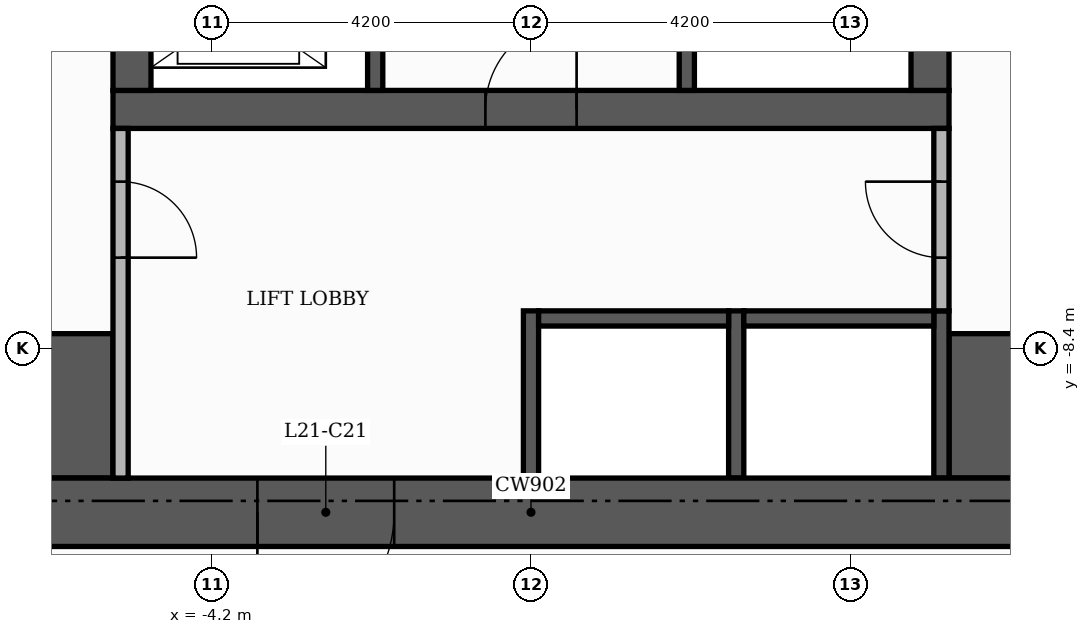
"""IFC4 building model, lengths in metres.
Left out: names, types, materials, properties, quantities, classifications, styles, units other than length and angle.
Written with IfcOpenShell. Run it as: python <this file> out.ifc"""

import sys

from ifc_helpers import new_model, si_unit, direction, frame, frame_2d, origin, place, context, subcontext, project, spatial, rectangle, extrude, element, fill, save


model = new_model("IFC4")
c1 = context("Model", 3, precision=1e-05, world=origin(), true_north=direction((0.0, 1.0)))
c2 = subcontext(c1, "Body", "Model", "MODEL_VIEW")
j1 = project(units=[si_unit("LENGTHUNIT", "METRE"), si_unit("PLANEANGLEUNIT", "RADIAN")], contexts=[c1])
p1 = place(None, origin())
s1 = spatial("IfcSite", under=j1, at=p1, CompositionType="ELEMENT")
p2 = place(p1, origin())
s2 = spatial("IfcBuilding", under=s1, at=p2, CompositionType="ELEMENT")
p3 = place(p2, frame((0.0, 0.0, 90.9)))
s3 = spatial("IfcBuildingStorey", under=s2, at=p3, CompositionType="ELEMENT", Elevation=90.9)
p4 = place(p3, frame((-5.5, -5.25, 0.0), z_axis=(0.0, 0.0, 1.0), x_axis=(1.0, 0.0, 0.0)))
e1 = element("IfcWall", 1, at=p4, inside=s3, PredefinedType="SHEAR", context=c2, shape_type="SweptSolid", body=[
    extrude(rectangle(XDim=11.0, YDim=0.5, at=frame_2d((5.5, 0.0))), origin(), (0.0, 0.0, 1.0), 3.48),
])
p5 = place(p4, frame((4.9, 0.0, 0.0)))
e2 = element("IfcOpeningElement", 2, at=p5, cuts=e1, PredefinedType="OPENING", context=c2, shape_type="SweptSolid", body=[
    extrude(rectangle(XDim=1.2, YDim=2.1, at=frame_2d((0.6, 1.05))), frame((0.0, 0.26, 0.0), z_axis=(0.0, -1.0, 0.0), x_axis=(1.0, 0.0, 0.0)), (0.0, 0.0, 1.0), 0.52),
])
for number, where, z_axis, x_axis in (
    (3, (-5.25, -5.0, 0.0), (0.0, 0.0, 1.0), (0.0, 1.0, 0.0)),
    (4, (5.25, -5.0, 0.0), (0.0, 0.0, 1.0), (0.0, 1.0, 0.0)),
):
    element("IfcWall", number, at=place(p3, frame(where, z_axis=z_axis, x_axis=x_axis)), inside=s3, PredefinedType="SHEAR", context=c2, shape_type="SweptSolid", body=[
        extrude(rectangle(XDim=10.5, YDim=0.5, at=frame_2d((5.25, 0.0))), origin(), (0.0, 0.0, 1.0), 3.48),
    ])
for number, where, z_axis, x_axis in (
    (5, (-10.1, -9.15, 0.0), (0.0, 0.0, 1.0), (1.0, 0.0, 0.0)),
    (6, (5.5, -9.15, 0.0), (0.0, 0.0, 1.0), (1.0, 0.0, 0.0)),
):
    element("IfcWall", number, at=place(p3, frame(where, z_axis=z_axis, x_axis=x_axis)), inside=s3, PredefinedType="SHEAR", context=c2, shape_type="SweptSolid", body=[
        extrude(rectangle(XDim=4.6, YDim=1.9, at=frame_2d((2.3, 0.0))), origin(), (0.0, 0.0, 1.0), 3.48),
    ])
p6 = place(p3, frame((2.05, -5.0, 0.0), z_axis=(0.0, 0.0, 1.0), x_axis=(0.0, 1.0, 0.0)))
e7 = element("IfcWall", 7, at=p6, inside=s3, PredefinedType="SHEAR", context=c2, shape_type="SweptSolid", body=[
    extrude(rectangle(XDim=6.6, YDim=0.2, at=frame_2d((3.3, 0.0))), origin(), (0.0, 0.0, 1.0), 3.48),
])
p7 = place(p6, frame((5.25, 0.0, 0.0)))
e8 = element("IfcOpeningElement", 8, at=p7, cuts=e7, PredefinedType="OPENING", context=c2, shape_type="SweptSolid", body=[
    extrude(rectangle(XDim=1.0, YDim=2.1, at=frame_2d((0.5, 1.05))), frame((0.0, 0.11, 0.0), z_axis=(0.0, -1.0, 0.0), x_axis=(1.0, 0.0, 0.0)), (0.0, 0.0, 1.0), 0.22),
])
for number, where, z_axis, x_axis in (
    (9, (0.0, -10.1, 0.0), (0.0, 0.0, 1.0), (0.0, 1.0, 0.0)),
    (10, (2.7, -10.1, 0.0), (0.0, 0.0, 1.0), (0.0, 1.0, 0.0)),
    (11, (5.4, -10.1, 0.0), (0.0, 0.0, 1.0), (0.0, 1.0, 0.0)),
):
    element("IfcWall", number, at=place(p3, frame(where, z_axis=z_axis, x_axis=x_axis)), inside=s3, PredefinedType="SHEAR", context=c2, shape_type="SweptSolid", body=[
        extrude(rectangle(XDim=2.2, YDim=0.2, at=frame_2d((1.1, 0.0))), origin(), (0.0, 0.0, 1.0), 3.48),
    ])
for number, where, z_axis, x_axis in (
    (12, (0.1, -8.0, 0.0), (0.0, 0.0, 1.0), (1.0, 0.0, 0.0)),
    (13, (2.8, -8.0, 0.0), (0.0, 0.0, 1.0), (1.0, 0.0, 0.0)),
):
    element("IfcWall", number, at=place(p3, frame(where, z_axis=z_axis, x_axis=x_axis)), inside=s3, PredefinedType="SHEAR", context=c2, shape_type="SweptSolid", body=[
        extrude(rectangle(XDim=2.5, YDim=0.2, at=frame_2d((1.25, 0.0))), origin(), (0.0, 0.0, 1.0), 3.48),
    ])
p8 = place(p3, frame((-2.05, -5.0, 0.0), z_axis=(0.0, 0.0, 1.0), x_axis=(0.0, 1.0, 0.0)))
e14 = element("IfcWall", 14, at=p8, inside=s3, PredefinedType="SHEAR", context=c2, shape_type="SweptSolid", body=[
    extrude(rectangle(XDim=3.4, YDim=0.2, at=frame_2d((1.7, 0.0))), origin(), (0.0, 0.0, 1.0), 3.48),
])
p9 = place(p8, frame((0.55, 0.0, 0.0)))
e15 = element("IfcOpeningElement", 15, at=p9, cuts=e14, PredefinedType="OPENING", context=c2, shape_type="SweptSolid", body=[
    extrude(rectangle(XDim=1.1, YDim=2.1, at=frame_2d((0.55, 1.05))), frame((0.0, 0.11, 0.0), z_axis=(0.0, -1.0, 0.0), x_axis=(1.0, 0.0, 0.0)), (0.0, 0.0, 1.0), 0.22),
])
p10 = place(p8, frame((2.45, 0.0, 0.0)))
e16 = element("IfcOpeningElement", 16, at=p10, cuts=e14, PredefinedType="OPENING", context=c2, shape_type="SweptSolid", body=[
    extrude(rectangle(XDim=0.8, YDim=2.1, at=frame_2d((0.4, 1.05))), frame((0.0, 0.11, 0.0), z_axis=(0.0, -1.0, 0.0), x_axis=(1.0, 0.0, 0.0)), (0.0, 0.0, 1.0), 0.22),
])
p11 = place(p3, frame((-11.0, -10.55, 0.0), z_axis=(0.0, 0.0, 1.0), x_axis=(1.0, 0.0, 0.0)))
e17 = element("IfcWall", 17, at=p11, inside=s3, PredefinedType="SHEAR", context=c2, shape_type="SweptSolid", body=[
    extrude(rectangle(XDim=22.0, YDim=0.9, at=frame_2d((11.0, 0.0))), origin(), (0.0, 0.0, 1.0), 3.48),
])
p12 = place(p11, frame((7.4, 0.0, 0.0)))
e18 = element("IfcOpeningElement", 18, at=p12, cuts=e17, PredefinedType="OPENING", context=c2, shape_type="SweptSolid", body=[
    extrude(rectangle(XDim=1.8, YDim=2.2, at=frame_2d((0.9, 1.1))), frame((0.0, 0.46, 0.0), z_axis=(0.0, -1.0, 0.0), x_axis=(1.0, 0.0, 0.0)), (0.0, 0.0, 1.0), 0.92),
])
p13 = place(p3, frame((-5.4, -10.1, 0.0), z_axis=(0.0, 0.0, 1.0), x_axis=(0.0, 1.0, 0.0)))
e19 = element("IfcWall", 19, at=p13, inside=s3, PredefinedType="PARTITIONING", context=c2, shape_type="SweptSolid", body=[
    extrude(rectangle(XDim=4.6, YDim=0.2, at=frame_2d((2.3, 0.0))), origin(), (0.0, 0.0, 1.0), 3.48),
])
p14 = place(p13, frame((2.9, 0.0, 0.0)))
e20 = element("IfcOpeningElement", 20, at=p14, cuts=e19, PredefinedType="OPENING", context=c2, shape_type="SweptSolid", body=[
    extrude(rectangle(XDim=1.0, YDim=2.1, at=frame_2d((0.5, 1.05))), frame((0.0, 0.11, 0.0), z_axis=(0.0, -1.0, 0.0), x_axis=(1.0, 0.0, 0.0)), (0.0, 0.0, 1.0), 0.22),
])
p15 = place(p3, frame((5.4, -7.9, 0.0), z_axis=(0.0, 0.0, 1.0), x_axis=(0.0, 1.0, 0.0)))
e21 = element("IfcWall", 21, at=p15, inside=s3, PredefinedType="PARTITIONING", context=c2, shape_type="SweptSolid", body=[
    extrude(rectangle(XDim=2.4, YDim=0.2, at=frame_2d((1.2, 0.0))), origin(), (0.0, 0.0, 1.0), 3.48),
])
p16 = place(p15, frame((0.7, 0.0, 0.0)))
e22 = element("IfcOpeningElement", 22, at=p16, cuts=e21, PredefinedType="OPENING", context=c2, shape_type="SweptSolid", body=[
    extrude(rectangle(XDim=1.0, YDim=2.1, at=frame_2d((0.5, 1.05))), frame((0.0, 0.11, 0.0), z_axis=(0.0, -1.0, 0.0), x_axis=(1.0, 0.0, 0.0)), (0.0, 0.0, 1.0), 0.22),
])
p17 = place(p5, origin())
e23 = element("IfcDoor", 23, at=p17, inside=s3, OperationType="SINGLE_SWING_RIGHT", PredefinedType="DOOR", context=c2, shape_type="SweptSolid", body=[
    extrude(rectangle(XDim=1.2, YDim=2.1, at=frame_2d((0.6, 1.05))), frame((0.0, 0.025, 0.0), z_axis=(0.0, -1.0, 0.0), x_axis=(1.0, 0.0, 0.0)), (0.0, 0.0, 1.0), 0.05),
])
fill(e2, e23)
p18 = place(p14, frame((1.0, 0.0, 0.0), z_axis=(0.0, 0.0, 1.0), x_axis=(-1.0, 0.0, 0.0)))
e24 = element("IfcDoor", 24, at=p18, inside=s3, OperationType="SINGLE_SWING_LEFT", PredefinedType="DOOR", context=c2, shape_type="SweptSolid", body=[
    extrude(rectangle(XDim=1.0, YDim=2.1, at=frame_2d((0.5, 1.05))), frame((0.0, 0.025, 0.0), z_axis=(0.0, -1.0, 0.0), x_axis=(1.0, 0.0, 0.0)), (0.0, 0.0, 1.0), 0.05),
])
fill(e20, e24)
p19 = place(p16, origin())
e25 = element("IfcDoor", 25, at=p19, inside=s3, OperationType="SINGLE_SWING_RIGHT", PredefinedType="DOOR", context=c2, shape_type="SweptSolid", body=[
    extrude(rectangle(XDim=1.0, YDim=2.1, at=frame_2d((0.5, 1.05))), frame((0.0, 0.025, 0.0), z_axis=(0.0, -1.0, 0.0), x_axis=(1.0, 0.0, 0.0)), (0.0, 0.0, 1.0), 0.05),
])
fill(e22, e25)
p20 = place(p12, frame((1.8, 0.0, 0.0), z_axis=(0.0, 0.0, 1.0), x_axis=(-1.0, 0.0, 0.0)))
e26 = element("IfcDoor", 26, at=p20, inside=s3, OperationType="DOUBLE_DOOR_SINGLE_SWING", PredefinedType="DOOR", context=c2, shape_type="SweptSolid", body=[
    extrude(rectangle(XDim=1.8, YDim=2.2, at=frame_2d((0.9, 1.1))), frame((0.0, 0.025, 0.0), z_axis=(0.0, -1.0, 0.0), x_axis=(1.0, 0.0, 0.0)), (0.0, 0.0, 1.0), 0.05),
])
fill(e18, e26)
save(model, sys.argv[1])
